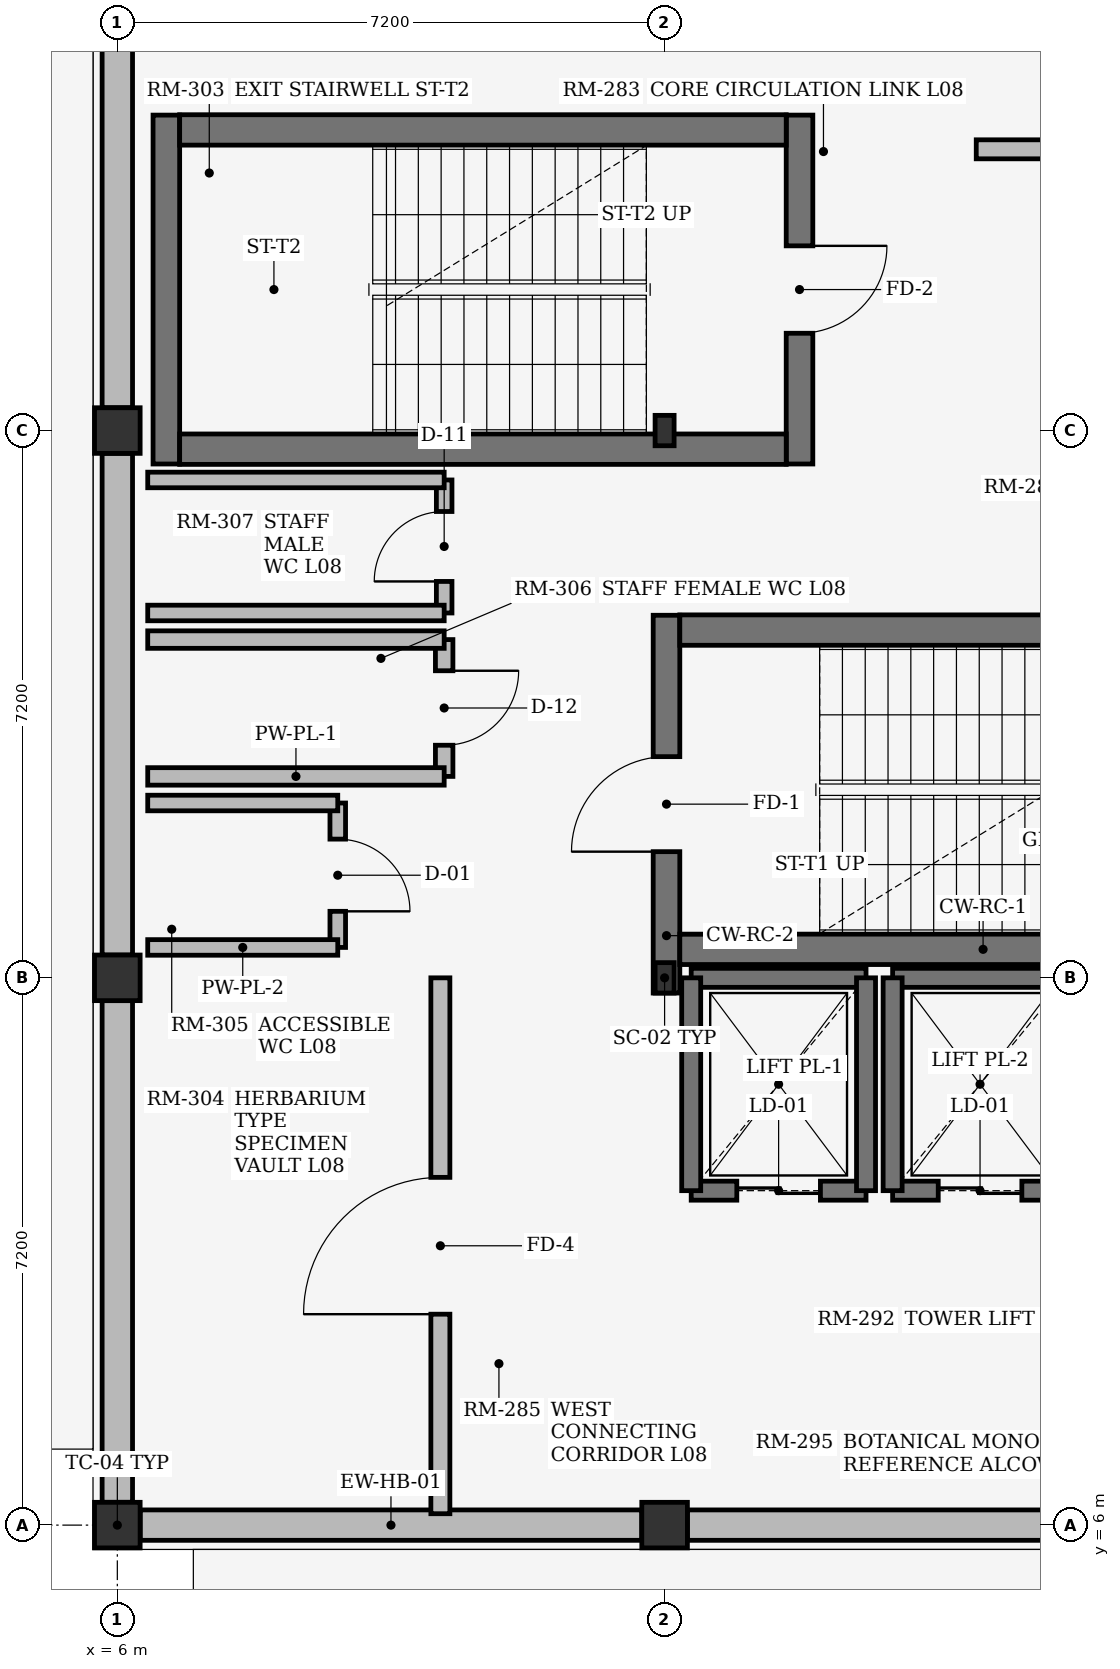
"""IFC4 building model, lengths in metres.
Left out: names, types, materials, properties, quantities, classifications, styles, units other than length and angle.
Written with IfcOpenShell. Run it as: python <this file> out.ifc"""

import sys

from ifc_helpers import new_model, si_unit, direction, frame, frame_2d, origin, origin_2d, place, context, subcontext, project, spatial, rectangle, i_section, extrude, element, fill, save


model = new_model("IFC4")
c1 = context("Model", 3, precision=1e-05, world=origin(), true_north=direction((0.0, 1.0)))
c2 = subcontext(c1, "Body", "Model", "MODEL_VIEW")
j1 = project(units=[si_unit("LENGTHUNIT", "METRE"), si_unit("PLANEANGLEUNIT", "RADIAN")], contexts=[c1])
p1 = place(None, origin())
s1 = spatial("IfcSite", under=j1, at=p1, CompositionType="ELEMENT")
p2 = place(p1, origin())
s2 = spatial("IfcBuilding", under=s1, at=p2, CompositionType="ELEMENT")
p3 = place(p2, frame((0.0, 0.0, 32.7)))
s3 = spatial("IfcBuildingStorey", under=s2, at=p3, CompositionType="ELEMENT", Elevation=32.7)
for number, where, z_axis, x_axis in (
    (1, (6.0, 6.0, 0.0), (0.0, 0.0, 1.0), (1.0, 0.0, 0.0)),
    (2, (6.0, 13.2, 0.0), (0.0, 0.0, 1.0), (1.0, 0.0, 0.0)),
    (3, (6.0, 20.4, 0.0), (0.0, 0.0, 1.0), (1.0, 0.0, 0.0)),
    (4, (13.2, 6.0, 0.0), (0.0, 0.0, 1.0), (1.0, 0.0, 0.0)),
):
    element("IfcColumn", number, at=place(p3, frame(where, z_axis=z_axis, x_axis=x_axis)), inside=s3, PredefinedType="COLUMN", context=c2, shape_type="SweptSolid", body=[
        extrude(rectangle(XDim=0.6, YDim=0.6, at=origin_2d()), origin(), (0.0, 0.0, 1.0), 3.56),
    ])
for number, where, z_axis, x_axis in (
    (5, (13.2, 13.2, 0.0), (0.0, 0.0, 1.0), (1.0, 0.0, 0.0)),
    (6, (13.2, 20.4, 0.0), (0.0, 0.0, 1.0), (1.0, 0.0, 0.0)),
):
    element("IfcColumn", number, at=place(p3, frame(where, z_axis=z_axis, x_axis=x_axis)), inside=s3, PredefinedType="COLUMN", context=c2, shape_type="SweptSolid", body=[
        extrude(i_section(OverallWidth=0.25, OverallDepth=0.4, WebThickness=0.01, FlangeThickness=0.013, at=origin_2d()), origin(), (0.0, 0.0, 1.0), 3.56),
    ])
p4 = place(p3, frame((6.3, 6.0, 0.0), z_axis=(0.0, 0.0, 1.0), x_axis=(1.0, 0.0, 0.0)))
e7 = element("IfcWall", 7, at=p4, inside=s3, PredefinedType="STANDARD", context=c2, shape_type="SweptSolid", body=[
    extrude(rectangle(XDim=6.6, YDim=0.4, at=frame_2d((3.3, 0.0))), origin(), (0.0, 0.0, 1.0), 3.04),
])
p5 = place(p3, frame((13.5, 6.0, 0.0), z_axis=(0.0, 0.0, 1.0), x_axis=(1.0, 0.0, 0.0)))
e8 = element("IfcWall", 8, at=p5, inside=s3, PredefinedType="STANDARD", context=c2, shape_type="SweptSolid", body=[
    extrude(rectangle(XDim=6.6, YDim=0.4, at=frame_2d((3.3, 0.0))), origin(), (0.0, 0.0, 1.0), 3.04),
])
p6 = place(p3, frame((6.0, 6.3, 0.0), z_axis=(0.0, 0.0, 1.0), x_axis=(0.0, 1.0, 0.0)))
e9 = element("IfcWall", 9, at=p6, inside=s3, PredefinedType="STANDARD", context=c2, shape_type="SweptSolid", body=[
    extrude(rectangle(XDim=6.6, YDim=0.4, at=frame_2d((3.3, 0.0))), origin(), (0.0, 0.0, 1.0), 3.04),
])
for number, where, z_axis, x_axis in (
    (10, (6.0, 13.5, 0.0), (0.0, 0.0, 1.0), (0.0, 1.0, 0.0)),
    (11, (6.0, 20.7, 0.0), (0.0, 0.0, 1.0), (0.0, 1.0, 0.0)),
):
    element("IfcWall", number, at=place(p3, frame(where, z_axis=z_axis, x_axis=x_axis)), inside=s3, PredefinedType="STANDARD", context=c2, shape_type="SweptSolid", body=[
        extrude(rectangle(XDim=6.6, YDim=0.4, at=frame_2d((3.3, 0.0))), origin(), (0.0, 0.0, 1.0), 3.04),
    ])
p7 = place(p3, frame((13.225, 13.0, 0.0), z_axis=(0.0, 0.0, 1.0), x_axis=(0.0, 1.0, 0.0)))
e12 = element("IfcWall", 12, at=p7, inside=s3, PredefinedType="SHEAR", context=c2, shape_type="SweptSolid", body=[
    extrude(rectangle(XDim=4.97, YDim=0.35, at=frame_2d((2.485, 0.0))), origin(), (0.0, 0.0, 1.0), 3.56),
])
p8 = place(p7, frame((1.86, 0.0, 0.0)))
e13 = element("IfcOpeningElement", 13, at=p8, cuts=e12, PredefinedType="OPENING", context=c2, shape_type="SweptSolid", body=[
    extrude(rectangle(XDim=1.25, YDim=2.2, at=frame_2d((0.625, 1.1))), frame((0.0, 0.185, 0.0), z_axis=(0.0, -1.0, 0.0), x_axis=(1.0, 0.0, 0.0)), (0.0, 0.0, 1.0), 0.37),
])
for number, where, z_axis, x_axis in (
    (14, (13.4, 13.575, 0.0), (0.0, 0.0, 1.0), (1.0, 0.0, 0.0)),
    (15, (13.4, 17.775, 0.0), (0.0, 0.0, 1.0), (1.0, 0.0, 0.0)),
):
    element("IfcWall", number, at=place(p3, frame(where, z_axis=z_axis, x_axis=x_axis)), inside=s3, PredefinedType="SHEAR", context=c2, shape_type="SweptSolid", body=[
        extrude(rectangle(XDim=7.98, YDim=0.4, at=frame_2d((3.99, 0.0))), origin(), (0.0, 0.0, 1.0), 3.56),
    ])
p9 = place(p3, frame((14.975, 24.55, 0.0), z_axis=(0.0, 0.0, 1.0), x_axis=(0.0, -1.0, 0.0)))
e16 = element("IfcWall", 16, at=p9, inside=s3, PredefinedType="SHEAR", context=c2, shape_type="SweptSolid", body=[
    extrude(rectangle(XDim=4.59, YDim=0.35, at=frame_2d((2.295, 0.0))), origin(), (0.0, 0.0, 1.0), 3.56),
])
p10 = place(p9, frame((1.72, 0.0, 0.0)))
e17 = element("IfcOpeningElement", 17, at=p10, cuts=e16, PredefinedType="OPENING", context=c2, shape_type="SweptSolid", body=[
    extrude(rectangle(XDim=1.15, YDim=2.2, at=frame_2d((0.575, 1.1))), frame((0.0, 0.185, 0.0), z_axis=(0.0, -1.0, 0.0), x_axis=(1.0, 0.0, 0.0)), (0.0, 0.0, 1.0), 0.37),
])
p11 = place(p3, frame((6.645, 24.55, 0.0), z_axis=(0.0, 0.0, 1.0), x_axis=(0.0, -1.0, 0.0)))
e18 = element("IfcWall", 18, at=p11, inside=s3, PredefinedType="SHEAR", context=c2, shape_type="SweptSolid", body=[
    extrude(rectangle(XDim=4.59, YDim=0.35, at=frame_2d((2.295, 0.0))), origin(), (0.0, 0.0, 1.0), 3.56),
])
for number, where, z_axis, x_axis in (
    (19, (14.8, 24.355, 0.0), (0.0, 0.0, 1.0), (-1.0, 0.0, 0.0)),
    (20, (14.8, 20.155, 0.0), (0.0, 0.0, 1.0), (-1.0, 0.0, 0.0)),
):
    element("IfcWall", number, at=place(p3, frame(where, z_axis=z_axis, x_axis=x_axis)), inside=s3, PredefinedType="SHEAR", context=c2, shape_type="SweptSolid", body=[
        extrude(rectangle(XDim=7.98, YDim=0.4, at=frame_2d((3.99, 0.0))), origin(), (0.0, 0.0, 1.0), 3.56),
    ])
p12 = place(p3, frame((13.55, 10.4, 0.0), z_axis=(0.0, 0.0, 1.0), x_axis=(1.0, 0.0, 0.0)))
e21 = element("IfcWall", 21, at=p12, inside=s3, PredefinedType="SHEAR", context=c2, shape_type="SweptSolid", body=[
    extrude(rectangle(XDim=2.3, YDim=0.25, at=frame_2d((1.15, 0.0))), origin(), (0.0, 0.0, 1.0), 3.56),
])
p13 = place(p12, frame((0.6, 0.0, 0.0)))
e22 = element("IfcOpeningElement", 22, at=p13, cuts=e21, PredefinedType="OPENING", context=c2, shape_type="SweptSolid", body=[
    extrude(rectangle(XDim=1.1, YDim=2.2, at=frame_2d((0.55, 1.1))), frame((0.0, 0.135, 0.0), z_axis=(0.0, -1.0, 0.0), x_axis=(1.0, 0.0, 0.0)), (0.0, 0.0, 1.0), 0.27),
])
p14 = place(p3, frame((13.55, 13.2, 0.0), z_axis=(0.0, 0.0, 1.0), x_axis=(1.0, 0.0, 0.0)))
e23 = element("IfcWall", 23, at=p14, inside=s3, PredefinedType="SHEAR", context=c2, shape_type="SweptSolid", body=[
    extrude(rectangle(XDim=2.3, YDim=0.25, at=frame_2d((1.15, 0.0))), origin(), (0.0, 0.0, 1.0), 3.56),
])
for number, where, z_axis, x_axis in (
    (24, (13.55, 10.4, 0.0), (0.0, 0.0, 1.0), (0.0, 1.0, 0.0)),
    (25, (15.85, 10.4, 0.0), (0.0, 0.0, 1.0), (0.0, 1.0, 0.0)),
):
    element("IfcWall", number, at=place(p3, frame(where, z_axis=z_axis, x_axis=x_axis)), inside=s3, PredefinedType="SHEAR", context=c2, shape_type="SweptSolid", body=[
        extrude(rectangle(XDim=2.8, YDim=0.25, at=frame_2d((1.4, 0.0))), origin(), (0.0, 0.0, 1.0), 3.56),
    ])
p15 = place(p3, frame((16.2, 10.4, 0.0), z_axis=(0.0, 0.0, 1.0), x_axis=(1.0, 0.0, 0.0)))
e26 = element("IfcWall", 26, at=p15, inside=s3, PredefinedType="SHEAR", context=c2, shape_type="SweptSolid", body=[
    extrude(rectangle(XDim=2.3, YDim=0.25, at=frame_2d((1.15, 0.0))), origin(), (0.0, 0.0, 1.0), 3.56),
])
p16 = place(p15, frame((0.6, 0.0, 0.0)))
e27 = element("IfcOpeningElement", 27, at=p16, cuts=e26, PredefinedType="OPENING", context=c2, shape_type="SweptSolid", body=[
    extrude(rectangle(XDim=1.1, YDim=2.2, at=frame_2d((0.55, 1.1))), frame((0.0, 0.135, 0.0), z_axis=(0.0, -1.0, 0.0), x_axis=(1.0, 0.0, 0.0)), (0.0, 0.0, 1.0), 0.27),
])
p17 = place(p3, frame((16.2, 13.2, 0.0), z_axis=(0.0, 0.0, 1.0), x_axis=(1.0, 0.0, 0.0)))
e28 = element("IfcWall", 28, at=p17, inside=s3, PredefinedType="SHEAR", context=c2, shape_type="SweptSolid", body=[
    extrude(rectangle(XDim=2.3, YDim=0.25, at=frame_2d((1.15, 0.0))), origin(), (0.0, 0.0, 1.0), 3.56),
])
p18 = place(p3, frame((16.2, 10.4, 0.0), z_axis=(0.0, 0.0, 1.0), x_axis=(0.0, 1.0, 0.0)))
e29 = element("IfcWall", 29, at=p18, inside=s3, PredefinedType="SHEAR", context=c2, shape_type="SweptSolid", body=[
    extrude(rectangle(XDim=2.8, YDim=0.25, at=frame_2d((1.4, 0.0))), origin(), (0.0, 0.0, 1.0), 3.56),
])
p19 = place(p3, frame((8.9, 13.6, 0.0), z_axis=(0.0, 0.0, 1.0), x_axis=(0.0, 1.0, 0.0)))
e30 = element("IfcWall", 30, at=p19, inside=s3, PredefinedType="PLUMBINGWALL", context=c2, shape_type="SweptSolid", body=[
    extrude(rectangle(XDim=1.9, YDim=0.205, at=frame_2d((0.95, 0.0))), origin(), (0.0, 0.0, 1.0), 3.54),
])
p20 = place(p19, frame((0.475, 0.0, 0.0)))
e31 = element("IfcOpeningElement", 31, at=p20, cuts=e30, PredefinedType="OPENING", context=c2, shape_type="SweptSolid", body=[
    extrude(rectangle(XDim=0.95, YDim=2.15, at=frame_2d((0.475, 1.075))), frame((0.0, 0.113, 0.0), z_axis=(0.0, -1.0, 0.0), x_axis=(1.0, 0.0, 0.0)), (0.0, 0.0, 1.0), 0.225),
])
for number, where, z_axis, x_axis in (
    (32, (6.4, 13.6, 0.0), (0.0, 0.0, 1.0), (1.0, 0.0, 0.0)),
    (33, (6.4, 15.5, 0.0), (0.0, 0.0, 1.0), (1.0, 0.0, 0.0)),
):
    element("IfcWall", number, at=place(p3, frame(where, z_axis=z_axis, x_axis=x_axis)), inside=s3, PredefinedType="PLUMBINGWALL", context=c2, shape_type="SweptSolid", body=[
        extrude(rectangle(XDim=2.5, YDim=0.205, at=frame_2d((1.25, 0.0))), origin(), (0.0, 0.0, 1.0), 3.54),
    ])
p21 = place(p3, frame((10.3, 15.85, 0.0), z_axis=(0.0, 0.0, 1.0), x_axis=(0.0, 1.0, 0.0)))
e34 = element("IfcWall", 34, at=p21, inside=s3, PredefinedType="PLUMBINGWALL", context=c2, shape_type="SweptSolid", body=[
    extrude(rectangle(XDim=1.8, YDim=0.23, at=frame_2d((0.9, 0.0))), origin(), (0.0, 0.0, 1.0), 3.54),
])
p22 = place(p21, frame((0.41, 0.0, 0.0)))
e35 = element("IfcOpeningElement", 35, at=p22, cuts=e34, PredefinedType="OPENING", context=c2, shape_type="SweptSolid", body=[
    extrude(rectangle(XDim=0.98, YDim=2.1, at=frame_2d((0.49, 1.05))), frame((0.0, 0.125, 0.0), z_axis=(0.0, -1.0, 0.0), x_axis=(1.0, 0.0, 0.0)), (0.0, 0.0, 1.0), 0.25),
])
for number, where, z_axis, x_axis in (
    (36, (6.4, 15.85, 0.0), (0.0, 0.0, 1.0), (1.0, 0.0, 0.0)),
    (37, (6.4, 17.65, 0.0), (0.0, 0.0, 1.0), (1.0, 0.0, 0.0)),
):
    element("IfcWall", number, at=place(p3, frame(where, z_axis=z_axis, x_axis=x_axis)), inside=s3, PredefinedType="PLUMBINGWALL", context=c2, shape_type="SweptSolid", body=[
        extrude(rectangle(XDim=3.9, YDim=0.23, at=frame_2d((1.95, 0.0))), origin(), (0.0, 0.0, 1.0), 3.54),
    ])
p23 = place(p3, frame((10.3, 18.0, 0.0), z_axis=(0.0, 0.0, 1.0), x_axis=(0.0, 1.0, 0.0)))
e38 = element("IfcWall", 38, at=p23, inside=s3, PredefinedType="PLUMBINGWALL", context=c2, shape_type="SweptSolid", body=[
    extrude(rectangle(XDim=1.75, YDim=0.205, at=frame_2d((0.875, 0.0))), origin(), (0.0, 0.0, 1.0), 3.54),
])
p24 = place(p23, frame((0.415, 0.0, 0.0)))
e39 = element("IfcOpeningElement", 39, at=p24, cuts=e38, PredefinedType="OPENING", context=c2, shape_type="SweptSolid", body=[
    extrude(rectangle(XDim=0.92, YDim=2.1, at=frame_2d((0.46, 1.05))), frame((0.0, 0.113, 0.0), z_axis=(0.0, -1.0, 0.0), x_axis=(1.0, 0.0, 0.0)), (0.0, 0.0, 1.0), 0.225),
])
for number, where, z_axis, x_axis in (
    (40, (6.4, 18.0, 0.0), (0.0, 0.0, 1.0), (1.0, 0.0, 0.0)),
    (41, (6.4, 19.75, 0.0), (0.0, 0.0, 1.0), (1.0, 0.0, 0.0)),
):
    element("IfcWall", number, at=place(p3, frame(where, z_axis=z_axis, x_axis=x_axis)), inside=s3, PredefinedType="PLUMBINGWALL", context=c2, shape_type="SweptSolid", body=[
        extrude(rectangle(XDim=3.9, YDim=0.205, at=frame_2d((1.95, 0.0))), origin(), (0.0, 0.0, 1.0), 3.54),
    ])
p25 = place(p3, frame((17.3, 24.1, 0.0), z_axis=(0.0, 0.0, 1.0), x_axis=(1.0, 0.0, 0.0)))
e42 = element("IfcWall", 42, at=p25, inside=s3, PredefinedType="SOLIDWALL", context=c2, shape_type="SweptSolid", body=[
    extrude(rectangle(XDim=4.0, YDim=0.25, at=frame_2d((2.0, 0.0))), origin(), (0.0, 0.0, 1.0), 3.54),
])
p26 = place(p25, frame((1.1, 0.0, 0.0)))
e43 = element("IfcOpeningElement", 43, at=p26, cuts=e42, PredefinedType="OPENING", context=c2, shape_type="SweptSolid", body=[
    extrude(rectangle(XDim=1.8, YDim=2.25, at=frame_2d((0.9, 1.125))), frame((0.0, 0.135, 0.0), z_axis=(0.0, -1.0, 0.0), x_axis=(1.0, 0.0, 0.0)), (0.0, 0.0, 1.0), 0.27),
])
p27 = place(p3, frame((10.25, 6.15, 0.0), z_axis=(0.0, 0.0, 1.0), x_axis=(0.0, 1.0, 0.0)))
e44 = element("IfcWall", 44, at=p27, inside=s3, PredefinedType="SOLIDWALL", context=c2, shape_type="SweptSolid", body=[
    extrude(rectangle(XDim=7.05, YDim=0.25, at=frame_2d((3.525, 0.0))), origin(), (0.0, 0.0, 1.0), 3.54),
])
p28 = place(p27, frame((2.625, 0.0, 0.0)))
e45 = element("IfcOpeningElement", 45, at=p28, cuts=e44, PredefinedType="OPENING", context=c2, shape_type="SweptSolid", body=[
    extrude(rectangle(XDim=1.8, YDim=2.25, at=frame_2d((0.9, 1.125))), frame((0.0, 0.135, 0.0), z_axis=(0.0, -1.0, 0.0), x_axis=(1.0, 0.0, 0.0)), (0.0, 0.0, 1.0), 0.27),
])
p29 = place(p8, origin())
e46 = element("IfcDoor", 46, at=p29, inside=s3, OperationType="SINGLE_SWING_LEFT", PredefinedType="DOOR", context=c2, shape_type="SweptSolid", body=[
    extrude(rectangle(XDim=1.25, YDim=2.2, at=frame_2d((0.625, 1.1))), frame((0.0, 0.025, 0.0), z_axis=(0.0, -1.0, 0.0), x_axis=(1.0, 0.0, 0.0)), (0.0, 0.0, 1.0), 0.05),
])
fill(e13, e46)
p30 = place(p10, origin())
e47 = element("IfcDoor", 47, at=p30, inside=s3, OperationType="SINGLE_SWING_LEFT", PredefinedType="DOOR", context=c2, shape_type="SweptSolid", body=[
    extrude(rectangle(XDim=1.15, YDim=2.2, at=frame_2d((0.575, 1.1))), frame((0.0, 0.025, 0.0), z_axis=(0.0, -1.0, 0.0), x_axis=(1.0, 0.0, 0.0)), (0.0, 0.0, 1.0), 0.05),
])
fill(e17, e47)
p31 = place(p13, origin())
e48 = element("IfcDoor", 48, at=p31, inside=s3, OperationType="DOUBLE_DOOR_SLIDING", PredefinedType="DOOR", context=c2, shape_type="SweptSolid", body=[
    extrude(rectangle(XDim=1.1, YDim=2.2, at=frame_2d((0.55, 1.1))), frame((0.0, 0.025, 0.0), z_axis=(0.0, -1.0, 0.0), x_axis=(1.0, 0.0, 0.0)), (0.0, 0.0, 1.0), 0.05),
])
fill(e22, e48)
p32 = place(p16, origin())
e49 = element("IfcDoor", 49, at=p32, inside=s3, OperationType="DOUBLE_DOOR_SLIDING", PredefinedType="DOOR", context=c2, shape_type="SweptSolid", body=[
    extrude(rectangle(XDim=1.1, YDim=2.2, at=frame_2d((0.55, 1.1))), frame((0.0, 0.025, 0.0), z_axis=(0.0, -1.0, 0.0), x_axis=(1.0, 0.0, 0.0)), (0.0, 0.0, 1.0), 0.05),
])
fill(e27, e49)
p33 = place(p20, frame((0.95, 0.0, 0.0), z_axis=(0.0, 0.0, 1.0), x_axis=(-1.0, 0.0, 0.0)))
e50 = element("IfcDoor", 50, at=p33, inside=s3, OperationType="SINGLE_SWING_LEFT", PredefinedType="DOOR", context=c2, shape_type="SweptSolid", body=[
    extrude(rectangle(XDim=0.95, YDim=2.15, at=frame_2d((0.475, 1.075))), frame((0.0, 0.025, 0.0), z_axis=(0.0, -1.0, 0.0), x_axis=(1.0, 0.0, 0.0)), (0.0, 0.0, 1.0), 0.05),
])
fill(e31, e50)
p34 = place(p22, origin())
e51 = element("IfcDoor", 51, at=p34, inside=s3, OperationType="SINGLE_SWING_RIGHT", PredefinedType="DOOR", context=c2, shape_type="SweptSolid", body=[
    extrude(rectangle(XDim=0.98, YDim=2.1, at=frame_2d((0.49, 1.05))), frame((0.0, 0.025, 0.0), z_axis=(0.0, -1.0, 0.0), x_axis=(1.0, 0.0, 0.0)), (0.0, 0.0, 1.0), 0.05),
])
fill(e35, e51)
p35 = place(p24, origin())
e52 = element("IfcDoor", 52, at=p35, inside=s3, OperationType="SINGLE_SWING_LEFT", PredefinedType="DOOR", context=c2, shape_type="SweptSolid", body=[
    extrude(rectangle(XDim=0.92, YDim=2.1, at=frame_2d((0.46, 1.05))), frame((0.0, 0.025, 0.0), z_axis=(0.0, -1.0, 0.0), x_axis=(1.0, 0.0, 0.0)), (0.0, 0.0, 1.0), 0.05),
])
fill(e39, e52)
p36 = place(p28, origin())
e53 = element("IfcDoor", 53, at=p36, inside=s3, OperationType="DOUBLE_DOOR_SINGLE_SWING", PredefinedType="DOOR", context=c2, shape_type="SweptSolid", body=[
    extrude(rectangle(XDim=1.8, YDim=2.25, at=frame_2d((0.9, 1.125))), frame((0.0, 0.025, 0.0), z_axis=(0.0, -1.0, 0.0), x_axis=(1.0, 0.0, 0.0)), (0.0, 0.0, 1.0), 0.05),
])
fill(e45, e53)
save(model, sys.argv[1])
